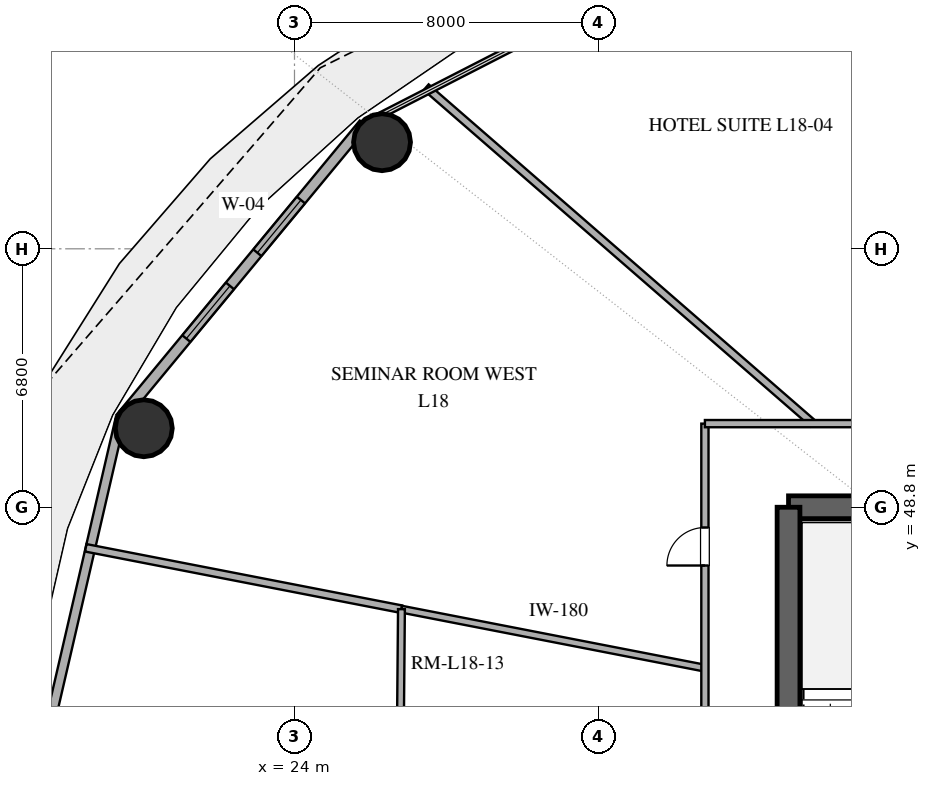
"""IFC4 building model, lengths in metres.
Left out: names, types, materials, properties, quantities, classifications, styles, units other than length and angle.
Written with IfcOpenShell. Run it as: python <this file> out.ifc"""

import sys

from ifc_helpers import new_model, si_unit, direction, frame, frame_2d, origin, origin_2d, place, context, subcontext, project, spatial, rectangle, hollow_circle, extrude, element, fill, save


model = new_model("IFC4")
c1 = context("Model", 3, precision=1e-05, world=origin(), true_north=direction((0.0, 1.0)))
c2 = subcontext(c1, "Body", "Model", "MODEL_VIEW")
j1 = project(units=[si_unit("LENGTHUNIT", "METRE"), si_unit("PLANEANGLEUNIT", "RADIAN")], contexts=[c1])
p1 = place(None, origin())
s1 = spatial("IfcSite", under=j1, at=p1, CompositionType="ELEMENT")
p2 = place(p1, origin())
s2 = spatial("IfcBuilding", under=s1, at=p2, CompositionType="ELEMENT")
p3 = place(p2, frame((0.0, 0.0, 75.0)))
s3 = spatial("IfcBuildingStorey", under=s2, at=p3, CompositionType="ELEMENT", Elevation=75.0)
p4 = place(p3, frame((37.0, 48.8, 0.0), z_axis=(0.0, 0.0, 1.0), x_axis=(1.0, 0.0, 0.0)))
e1 = element("IfcWall", 1, at=p4, inside=s3, PredefinedType="SHEAR", context=c2, shape_type="SweptSolid", body=[
    extrude(rectangle(XDim=4.0, YDim=0.6, at=frame_2d((2.0, 0.0))), origin(), (0.0, 0.0, 1.0), 3.25),
])
p5 = place(p3, frame((37.0, 35.2, 0.0), z_axis=(0.0, 0.0, 1.0), x_axis=(0.0, 1.0, 0.0)))
e2 = element("IfcWall", 2, at=p5, inside=s3, PredefinedType="SHEAR", context=c2, shape_type="SweptSolid", body=[
    extrude(rectangle(XDim=13.6, YDim=0.6, at=frame_2d((6.8, 0.0))), origin(), (0.0, 0.0, 1.0), 3.25),
])
p6 = place(p5, frame((1.5, 0.0, 0.0)))
e3 = element("IfcOpeningElement", 3, at=p6, cuts=e2, PredefinedType="OPENING", context=c2, shape_type="SweptSolid", body=[
    extrude(rectangle(XDim=1.2, YDim=2.15, at=frame_2d((0.6, 1.075))), frame((0.0, 0.31, 0.0), z_axis=(0.0, -1.0, 0.0), x_axis=(1.0, 0.0, 0.0)), (0.0, 0.0, 1.0), 0.62),
])
for number, where, z_axis, x_axis in (
    (4, (26.303, 58.405, 0.0), (0.0, 0.0, 1.0), (1.0, 0.0, 0.0)),
    (5, (20.034, 50.878, 0.0), (0.0, 0.0, 1.0), (1.0, 0.0, 0.0)),
):
    element("IfcColumn", number, at=place(p3, frame(where, z_axis=z_axis, x_axis=x_axis)), inside=s3, PredefinedType="COLUMN", context=c2, shape_type="SweptSolid", body=[
        extrude(hollow_circle(Radius=0.75, WallThickness=0.04, at=origin_2d()), origin(), (0.0, 0.0, 1.0), 3.25),
    ])
p7 = place(p3, frame((25.826, 58.886, 0.0), z_axis=(0.0, 0.0, 1.0), x_axis=(-0.637296809613, -0.770618437657, 0.0)))
e6 = element("IfcWall", 6, at=p7, inside=s3, PredefinedType="SOLIDWALL", context=c2, shape_type="SweptSolid", body=[
    extrude(rectangle(XDim=10.053, YDim=0.28, at=frame_2d((5.027, 0.0))), origin(), (0.0, 0.0, 1.0), 3.25),
])
p8 = place(p7, frame((2.598, 0.0, 0.85)))
e7 = element("IfcOpeningElement", 7, at=p8, cuts=e6, PredefinedType="OPENING", context=c2, shape_type="SweptSolid", body=[
    extrude(rectangle(XDim=1.8, YDim=2.2, at=frame_2d((0.9, 1.1))), frame((0.0, 0.15, 0.0), z_axis=(0.0, -1.0, 0.0), x_axis=(1.0, 0.0, 0.0)), (0.0, 0.0, 1.0), 0.3),
])
p9 = place(p7, frame((5.53, 0.0, 0.85)))
e8 = element("IfcOpeningElement", 8, at=p9, cuts=e6, PredefinedType="OPENING", context=c2, shape_type="SweptSolid", body=[
    extrude(rectangle(XDim=1.8, YDim=2.2, at=frame_2d((0.9, 1.1))), frame((0.0, 0.15, 0.0), z_axis=(0.0, -1.0, 0.0), x_axis=(1.0, 0.0, 0.0)), (0.0, 0.0, 1.0), 0.3),
])
p10 = place(p3, frame((19.419, 51.138, 0.0), z_axis=(0.0, 0.0, 1.0), x_axis=(-0.225454452941, -0.974253709076, 0.0)))
e9 = element("IfcWall", 9, at=p10, inside=s3, PredefinedType="SOLIDWALL", context=c2, shape_type="SweptSolid", body=[
    extrude(rectangle(XDim=9.38, YDim=0.25, at=frame_2d((4.69, 0.0))), origin(), (0.0, 0.0, 1.0), 3.25),
])
p11 = place(p3, frame((37.647, 51.0, 0.0), z_axis=(0.0, 0.0, 1.0), x_axis=(-0.754713815472, 0.656054156862, 0.0)))
e10 = element("IfcWall", 10, at=p11, inside=s3, PredefinedType="PARTITIONING", context=c2, shape_type="SweptSolid", body=[
    extrude(rectangle(XDim=13.491, YDim=0.2, at=frame_2d((6.746, 0.0))), origin(), (0.0, 0.0, 1.0), 2.61),
])
p12 = place(p3, frame((18.508, 47.733, 0.0), z_axis=(0.0, 0.0, 1.0), x_axis=(0.981626048747, -0.190814832812, 0.0)))
e11 = element("IfcWall", 11, at=p12, inside=s3, PredefinedType="PARTITIONING", context=c2, shape_type="SweptSolid", body=[
    extrude(rectangle(XDim=8.462, YDim=0.2, at=frame_2d((4.231, 0.0))), origin(), (0.0, 0.0, 1.0), 2.61),
])
p13 = place(p3, frame((26.815, 46.118, 0.0), z_axis=(0.0, 0.0, 1.0), x_axis=(0.981631630513, -0.190786115787, 0.0)))
e12 = element("IfcWall", 12, at=p13, inside=s3, PredefinedType="PLUMBINGWALL", context=c2, shape_type="SweptSolid", body=[
    extrude(rectangle(XDim=8.135, YDim=0.18, at=frame_2d((4.067, 0.0))), origin(), (0.0, 0.0, 1.0), 2.61),
])
p14 = place(p3, frame((34.8, 42.083, 0.0), z_axis=(0.0, 0.0, 1.0), x_axis=(0.0, 1.0, 0.0)))
e13 = element("IfcWall", 13, at=p14, inside=s3, PredefinedType="PARTITIONING", context=c2, shape_type="SweptSolid", body=[
    extrude(rectangle(XDim=8.917, YDim=0.19, at=frame_2d((4.458, 0.0))), origin(), (0.0, 0.0, 1.0), 2.61),
])
p15 = place(p14, frame((5.183, 0.0, 0.0)))
e14 = element("IfcOpeningElement", 14, at=p15, cuts=e13, PredefinedType="OPENING", context=c2, shape_type="SweptSolid", body=[
    extrude(rectangle(XDim=1.0, YDim=2.2, at=frame_2d((0.5, 1.1))), frame((0.0, 0.105, 0.0), z_axis=(0.0, -1.0, 0.0), x_axis=(1.0, 0.0, 0.0)), (0.0, 0.0, 1.0), 0.21),
])
p16 = place(p3, frame((34.8, 51.0, 0.0), z_axis=(0.0, 0.0, 1.0), x_axis=(1.0, 0.0, 0.0)))
e15 = element("IfcWall", 15, at=p16, inside=s3, PredefinedType="PARTITIONING", context=c2, shape_type="SweptSolid", body=[
    extrude(rectangle(XDim=10.135, YDim=0.19, at=frame_2d((5.067, 0.0))), origin(), (0.0, 0.0, 1.0), 2.61),
])
p17 = place(p16, frame((4.996, 0.0, 0.0)))
e16 = element("IfcOpeningElement", 16, at=p17, cuts=e15, PredefinedType="OPENING", context=c2, shape_type="SweptSolid", body=[
    extrude(rectangle(XDim=0.95, YDim=2.15, at=frame_2d((0.475, 1.075))), frame((0.0, 0.105, 0.0), z_axis=(0.0, -1.0, 0.0), x_axis=(1.0, 0.0, 0.0)), (0.0, 0.0, 1.0), 0.21),
])
p18 = place(p3, frame((26.781, 42.185, 0.0), z_axis=(0.0, 0.0, 1.0), x_axis=(0.008691005249, 0.999962232501, 0.0)))
e17 = element("IfcWall", 17, at=p18, inside=s3, PredefinedType="PLUMBINGWALL", context=c2, shape_type="SweptSolid", body=[
    extrude(rectangle(XDim=3.933, YDim=0.18, at=frame_2d((1.966, 0.0))), origin(), (0.0, 0.0, 1.0), 2.61),
])
p19 = place(p8, origin())
e18 = element("IfcWindow", 18, at=p19, inside=s3, PartitioningType="SINGLE_PANEL", PredefinedType="WINDOW", context=c2, shape_type="SweptSolid", body=[
    extrude(rectangle(XDim=1.8, YDim=2.2, at=frame_2d((0.9, 1.1))), frame((0.0, 0.03, 0.0), z_axis=(0.0, -1.0, 0.0), x_axis=(1.0, 0.0, 0.0)), (0.0, 0.0, 1.0), 0.06),
])
fill(e7, e18)
p20 = place(p9, origin())
e19 = element("IfcWindow", 19, at=p20, inside=s3, PartitioningType="SINGLE_PANEL", PredefinedType="WINDOW", context=c2, shape_type="SweptSolid", body=[
    extrude(rectangle(XDim=1.8, YDim=2.2, at=frame_2d((0.9, 1.1))), frame((0.0, 0.03, 0.0), z_axis=(0.0, -1.0, 0.0), x_axis=(1.0, 0.0, 0.0)), (0.0, 0.0, 1.0), 0.06),
])
fill(e8, e19)
p21 = place(p15, origin())
e20 = element("IfcDoor", 20, at=p21, inside=s3, OperationType="SINGLE_SWING_LEFT", PredefinedType="DOOR", context=c2, shape_type="SweptSolid", body=[
    extrude(rectangle(XDim=1.0, YDim=2.2, at=frame_2d((0.5, 1.1))), frame((0.0, 0.025, 0.0), z_axis=(0.0, -1.0, 0.0), x_axis=(1.0, 0.0, 0.0)), (0.0, 0.0, 1.0), 0.05),
])
fill(e14, e20)
save(model, sys.argv[1])
